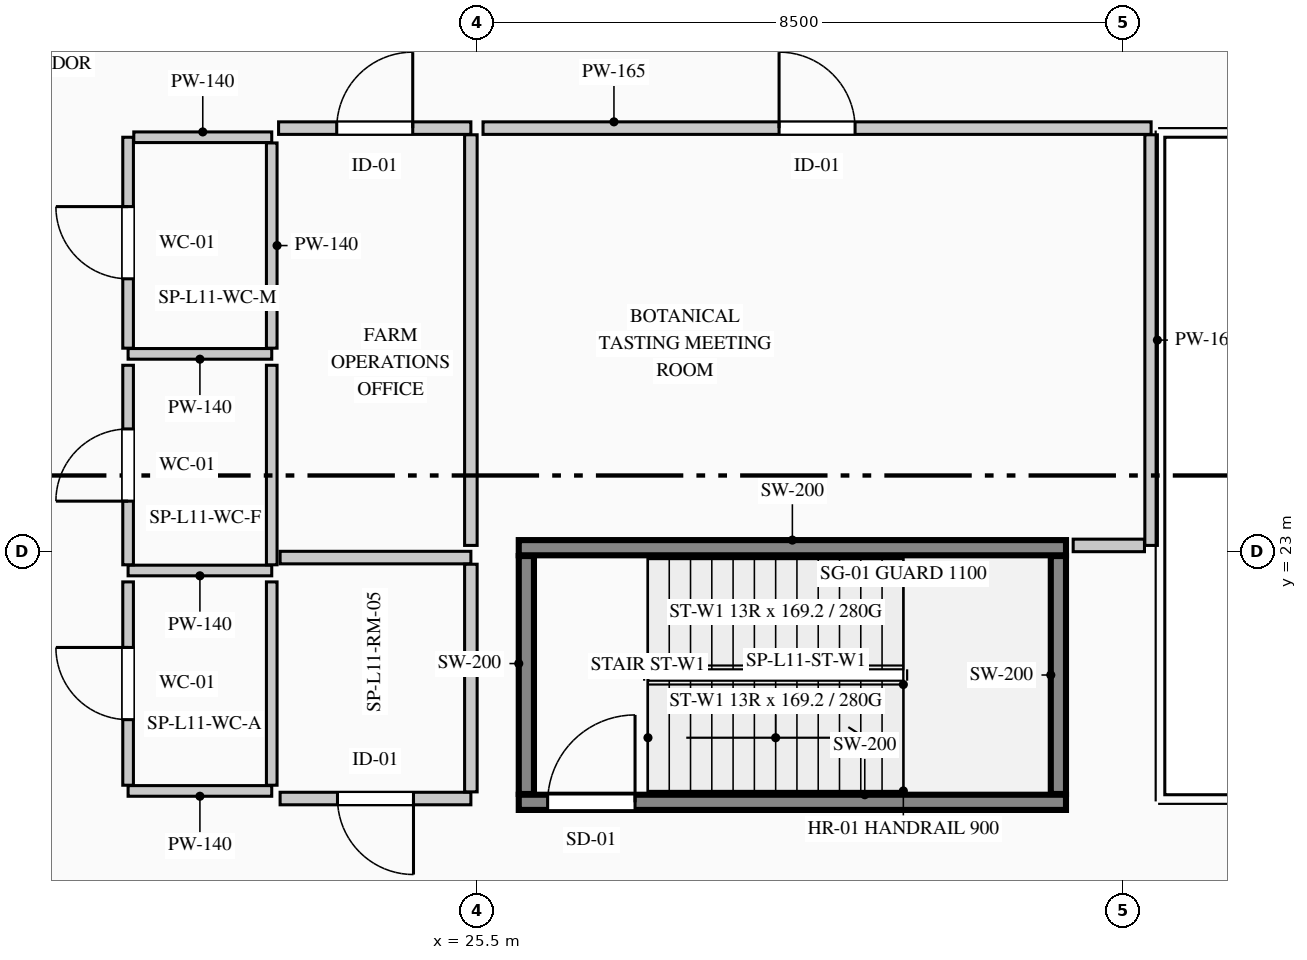
"""IFC4 building model, lengths in metres.
Left out: names, types, materials, properties, quantities, classifications, styles, units other than length and angle.
Written with IfcOpenShell. Run it as: python <this file> out.ifc"""

import sys

from ifc_helpers import new_model, si_unit, direction, frame, frame_2d, origin, place, context, subcontext, project, spatial, rectangle, extrude, element, fill, save


model = new_model("IFC4")
c1 = context("Model", 3, precision=1e-05, world=origin(), true_north=direction((0.0, 1.0)))
c2 = subcontext(c1, "Body", "Model", "MODEL_VIEW")
j1 = project(units=[si_unit("LENGTHUNIT", "METRE"), si_unit("PLANEANGLEUNIT", "RADIAN")], contexts=[c1])
p1 = place(None, origin())
s1 = spatial("IfcSite", under=j1, at=p1, CompositionType="ELEMENT")
p2 = place(p1, origin())
s2 = spatial("IfcBuilding", under=s1, at=p2, CompositionType="ELEMENT")
p3 = place(p2, frame((0.0, 0.0, 49.0)))
s3 = spatial("IfcBuildingStorey", under=s2, at=p3, CompositionType="ELEMENT", Elevation=49.0)
p4 = place(p3, frame((26.05, 19.7, 0.0), z_axis=(0.0, 0.0, 1.0), x_axis=(1.0, 0.0, 0.0)))
e1 = element("IfcWall", 1, at=p4, inside=s3, PredefinedType="SHEAR", context=c2, shape_type="SweptSolid", body=[
    extrude(rectangle(XDim=7.2, YDim=0.2, at=frame_2d((3.6, 0.0))), origin(), (0.0, 0.0, 1.0), 4.4),
])
p5 = place(p4, frame((0.38, 0.0, 0.0)))
e2 = element("IfcOpeningElement", 2, at=p5, cuts=e1, PredefinedType="OPENING", context=c2, shape_type="SweptSolid", body=[
    extrude(rectangle(XDim=1.15, YDim=2.2, at=frame_2d((0.575, 1.1))), frame((0.0, 0.11, 0.0), z_axis=(0.0, -1.0, 0.0), x_axis=(1.0, 0.0, 0.0)), (0.0, 0.0, 1.0), 0.22),
])
p6 = place(p3, frame((26.05, 23.05, 0.0), z_axis=(0.0, 0.0, 1.0), x_axis=(1.0, 0.0, 0.0)))
e3 = element("IfcWall", 3, at=p6, inside=s3, PredefinedType="SHEAR", context=c2, shape_type="SweptSolid", body=[
    extrude(rectangle(XDim=7.2, YDim=0.2, at=frame_2d((3.6, 0.0))), origin(), (0.0, 0.0, 1.0), 4.4),
])
for number, where, z_axis, x_axis in (
    (4, (26.15, 19.81, 0.0), (0.0, 0.0, 1.0), (0.0, 1.0, 0.0)),
    (5, (33.15, 19.81, 0.0), (0.0, 0.0, 1.0), (0.0, 1.0, 0.0)),
):
    element("IfcWall", number, at=place(p3, frame(where, z_axis=z_axis, x_axis=x_axis)), inside=s3, PredefinedType="SHEAR", context=c2, shape_type="SweptSolid", body=[
        extrude(rectangle(XDim=3.13, YDim=0.2, at=frame_2d((1.565, 0.0))), origin(), (0.0, 0.0, 1.0), 4.4),
    ])
p7 = place(p3, frame((22.8, 25.6, 0.0), z_axis=(0.0, 0.0, 1.0), x_axis=(-1.0, 0.0, 0.0)))
e6 = element("IfcWall", 6, at=p7, inside=s3, PredefinedType="PARTITIONING", context=c2, shape_type="SweptSolid", body=[
    extrude(rectangle(XDim=1.89, YDim=0.14, at=frame_2d((0.945, 0.0))), origin(), (0.0, 0.0, 1.0), 4.1),
])
p8 = place(p3, frame((20.91, 25.675, 0.0), z_axis=(0.0, 0.0, 1.0), x_axis=(0.0, 1.0, 0.0)))
e7 = element("IfcWall", 7, at=p8, inside=s3, PredefinedType="PARTITIONING", context=c2, shape_type="SweptSolid", body=[
    extrude(rectangle(XDim=2.775, YDim=0.14, at=frame_2d((1.387, 0.0))), origin(), (0.0, 0.0, 1.0), 4.1),
])
p9 = place(p8, frame((0.913, 0.0, 0.0)))
e8 = element("IfcOpeningElement", 8, at=p9, cuts=e7, PredefinedType="OPENING", context=c2, shape_type="SweptSolid", body=[
    extrude(rectangle(XDim=0.95, YDim=2.15, at=frame_2d((0.475, 1.075))), frame((0.0, 0.08, 0.0), z_axis=(0.0, -1.0, 0.0), x_axis=(1.0, 0.0, 0.0)), (0.0, 0.0, 1.0), 0.16),
])
p10 = place(p3, frame((20.985, 28.45, 0.0), z_axis=(0.0, 0.0, 1.0), x_axis=(1.0, 0.0, 0.0)))
e9 = element("IfcWall", 9, at=p10, inside=s3, PredefinedType="PARTITIONING", context=c2, shape_type="SweptSolid", body=[
    extrude(rectangle(XDim=1.815, YDim=0.14, at=frame_2d((0.907, 0.0))), origin(), (0.0, 0.0, 1.0), 4.1),
])
p11 = place(p3, frame((22.8, 28.375, 0.0), z_axis=(0.0, 0.0, 1.0), x_axis=(0.0, -1.0, 0.0)))
e10 = element("IfcWall", 10, at=p11, inside=s3, PredefinedType="PARTITIONING", context=c2, shape_type="SweptSolid", body=[
    extrude(rectangle(XDim=2.7, YDim=0.14, at=frame_2d((1.35, 0.0))), origin(), (0.0, 0.0, 1.0), 3.785),
])
p12 = place(p3, frame((22.8, 22.75, 0.0), z_axis=(0.0, 0.0, 1.0), x_axis=(-1.0, 0.0, 0.0)))
e11 = element("IfcWall", 11, at=p12, inside=s3, PredefinedType="PARTITIONING", context=c2, shape_type="SweptSolid", body=[
    extrude(rectangle(XDim=1.89, YDim=0.14, at=frame_2d((0.945, 0.0))), origin(), (0.0, 0.0, 1.0), 4.1),
])
p13 = place(p3, frame((20.91, 22.825, 0.0), z_axis=(0.0, 0.0, 1.0), x_axis=(0.0, 1.0, 0.0)))
e12 = element("IfcWall", 12, at=p13, inside=s3, PredefinedType="PARTITIONING", context=c2, shape_type="SweptSolid", body=[
    extrude(rectangle(XDim=2.625, YDim=0.14, at=frame_2d((1.312, 0.0))), origin(), (0.0, 0.0, 1.0), 4.1),
])
p14 = place(p13, frame((0.837, 0.0, 0.0)))
e13 = element("IfcOpeningElement", 13, at=p14, cuts=e12, PredefinedType="OPENING", context=c2, shape_type="SweptSolid", body=[
    extrude(rectangle(XDim=0.95, YDim=2.15, at=frame_2d((0.475, 1.075))), frame((0.0, 0.08, 0.0), z_axis=(0.0, -1.0, 0.0), x_axis=(1.0, 0.0, 0.0)), (0.0, 0.0, 1.0), 0.16),
])
p15 = place(p3, frame((22.8, 25.45, 0.0), z_axis=(0.0, 0.0, 1.0), x_axis=(0.0, -1.0, 0.0)))
e14 = element("IfcWall", 14, at=p15, inside=s3, PredefinedType="PARTITIONING", context=c2, shape_type="SweptSolid", body=[
    extrude(rectangle(XDim=2.625, YDim=0.14, at=frame_2d((1.312, 0.0))), origin(), (0.0, 0.0, 1.0), 3.785),
])
p16 = place(p3, frame((22.8, 19.85, 0.0), z_axis=(0.0, 0.0, 1.0), x_axis=(-1.0, 0.0, 0.0)))
e15 = element("IfcWall", 15, at=p16, inside=s3, PredefinedType="PARTITIONING", context=c2, shape_type="SweptSolid", body=[
    extrude(rectangle(XDim=1.89, YDim=0.14, at=frame_2d((0.945, 0.0))), origin(), (0.0, 0.0, 1.0), 4.1),
])
p17 = place(p3, frame((20.91, 19.925, 0.0), z_axis=(0.0, 0.0, 1.0), x_axis=(0.0, 1.0, 0.0)))
e16 = element("IfcWall", 16, at=p17, inside=s3, PredefinedType="PARTITIONING", context=c2, shape_type="SweptSolid", body=[
    extrude(rectangle(XDim=2.675, YDim=0.14, at=frame_2d((1.337, 0.0))), origin(), (0.0, 0.0, 1.0), 4.1),
])
p18 = place(p17, frame((0.863, 0.0, 0.0)))
e17 = element("IfcOpeningElement", 17, at=p18, cuts=e16, PredefinedType="OPENING", context=c2, shape_type="SweptSolid", body=[
    extrude(rectangle(XDim=0.95, YDim=2.15, at=frame_2d((0.475, 1.075))), frame((0.0, 0.08, 0.0), z_axis=(0.0, -1.0, 0.0), x_axis=(1.0, 0.0, 0.0)), (0.0, 0.0, 1.0), 0.16),
])
p19 = place(p3, frame((22.8, 22.6, 0.0), z_axis=(0.0, 0.0, 1.0), x_axis=(0.0, -1.0, 0.0)))
e18 = element("IfcWall", 18, at=p19, inside=s3, PredefinedType="PARTITIONING", context=c2, shape_type="SweptSolid", body=[
    extrude(rectangle(XDim=2.675, YDim=0.14, at=frame_2d((1.337, 0.0))), origin(), (0.0, 0.0, 1.0), 3.785),
])
p20 = place(p3, frame((25.42, 19.75, 0.0), z_axis=(0.0, 0.0, 1.0), x_axis=(-1.0, 0.0, 0.0)))
e19 = element("IfcWall", 19, at=p20, inside=s3, PredefinedType="PARTITIONING", context=c2, shape_type="SweptSolid", body=[
    extrude(rectangle(XDim=2.51, YDim=0.165, at=frame_2d((1.255, 0.0))), origin(), (0.0, 0.0, 1.0), 4.1),
])
p21 = place(p20, frame((0.755, 0.0, 0.0)))
e20 = element("IfcOpeningElement", 20, at=p21, cuts=e19, PredefinedType="OPENING", context=c2, shape_type="SweptSolid", body=[
    extrude(rectangle(XDim=1.0, YDim=2.15, at=frame_2d((0.5, 1.075))), frame((0.0, 0.093, 0.0), z_axis=(0.0, -1.0, 0.0), x_axis=(1.0, 0.0, 0.0)), (0.0, 0.0, 1.0), 0.185),
])
p22 = place(p3, frame((22.91, 22.92, 0.0), z_axis=(0.0, 0.0, 1.0), x_axis=(1.0, 0.0, 0.0)))
e21 = element("IfcWall", 21, at=p22, inside=s3, PredefinedType="PARTITIONING", context=c2, shape_type="SweptSolid", body=[
    extrude(rectangle(XDim=2.51, YDim=0.165, at=frame_2d((1.255, 0.0))), origin(), (0.0, 0.0, 1.0), 4.1),
])
p23 = place(p3, frame((25.42, 22.833, 0.0), z_axis=(0.0, 0.0, 1.0), x_axis=(0.0, -1.0, 0.0)))
e22 = element("IfcWall", 22, at=p23, inside=s3, PredefinedType="PARTITIONING", context=c2, shape_type="SweptSolid", body=[
    extrude(rectangle(XDim=2.995, YDim=0.165, at=frame_2d((1.498, 0.0))), origin(), (0.0, 0.0, 1.0), 3.285),
])
p24 = place(p3, frame((22.89, 28.57, 0.0), z_axis=(0.0, 0.0, 1.0), x_axis=(1.0, 0.0, 0.0)))
e23 = element("IfcWall", 23, at=p24, inside=s3, PredefinedType="PARTITIONING", context=c2, shape_type="SweptSolid", body=[
    extrude(rectangle(XDim=2.53, YDim=0.165, at=frame_2d((1.265, 0.0))), origin(), (0.0, 0.0, 1.0), 4.1),
])
p25 = place(p24, frame((0.765, 0.0, 0.0)))
e24 = element("IfcOpeningElement", 24, at=p25, cuts=e23, PredefinedType="OPENING", context=c2, shape_type="SweptSolid", body=[
    extrude(rectangle(XDim=1.0, YDim=2.15, at=frame_2d((0.5, 1.075))), frame((0.0, 0.093, 0.0), z_axis=(0.0, -1.0, 0.0), x_axis=(1.0, 0.0, 0.0)), (0.0, 0.0, 1.0), 0.185),
])
p26 = place(p3, frame((25.42, 28.482, 0.0), z_axis=(0.0, 0.0, 1.0), x_axis=(0.0, -1.0, 0.0)))
e25 = element("IfcWall", 25, at=p26, inside=s3, PredefinedType="PARTITIONING", context=c2, shape_type="SweptSolid", body=[
    extrude(rectangle(XDim=5.402, YDim=0.165, at=frame_2d((2.701, 0.0))), origin(), (0.0, 0.0, 1.0), 3.285),
])
p27 = place(p3, frame((25.58, 28.57, 0.0), z_axis=(0.0, 0.0, 1.0), x_axis=(1.0, 0.0, 0.0)))
e26 = element("IfcWall", 26, at=p27, inside=s3, PredefinedType="PARTITIONING", context=c2, shape_type="SweptSolid", body=[
    extrude(rectangle(XDim=8.79, YDim=0.165, at=frame_2d((4.395, 0.0))), origin(), (0.0, 0.0, 1.0), 3.785),
])
p28 = place(p27, frame((3.895, 0.0, 0.0)))
e27 = element("IfcOpeningElement", 27, at=p28, cuts=e26, PredefinedType="OPENING", context=c2, shape_type="SweptSolid", body=[
    extrude(rectangle(XDim=1.0, YDim=2.15, at=frame_2d((0.5, 1.075))), frame((0.0, 0.093, 0.0), z_axis=(0.0, -1.0, 0.0), x_axis=(1.0, 0.0, 0.0)), (0.0, 0.0, 1.0), 0.185),
])
p29 = place(p3, frame((34.37, 28.482, 0.0), z_axis=(0.0, 0.0, 1.0), x_axis=(0.0, -1.0, 0.0)))
e28 = element("IfcWall", 28, at=p29, inside=s3, PredefinedType="PARTITIONING", context=c2, shape_type="SweptSolid", body=[
    extrude(rectangle(XDim=5.402, YDim=0.165, at=frame_2d((2.701, 0.0))), origin(), (0.0, 0.0, 1.0), 4.1),
])
p30 = place(p3, frame((34.282, 23.08, 0.0), z_axis=(0.0, 0.0, 1.0), x_axis=(-1.0, 0.0, 0.0)))
e29 = element("IfcWall", 29, at=p30, inside=s3, PredefinedType="PARTITIONING", context=c2, shape_type="SweptSolid", body=[
    extrude(rectangle(XDim=0.938, YDim=0.165, at=frame_2d((0.469, 0.0))), origin(), (0.0, 0.0, 1.0), 4.1),
])
p31 = place(p5, origin())
e30 = element("IfcDoor", 30, at=p31, inside=s3, OperationType="SINGLE_SWING_RIGHT", PredefinedType="DOOR", context=c2, shape_type="SweptSolid", body=[
    extrude(rectangle(XDim=1.15, YDim=2.2, at=frame_2d((0.575, 1.1))), frame((0.0, 0.025, 0.0), z_axis=(0.0, -1.0, 0.0), x_axis=(1.0, 0.0, 0.0)), (0.0, 0.0, 1.0), 0.05),
])
fill(e2, e30)
p32 = place(p9, origin())
e31 = element("IfcDoor", 31, at=p32, inside=s3, OperationType="SINGLE_SWING_RIGHT", PredefinedType="DOOR", context=c2, shape_type="SweptSolid", body=[
    extrude(rectangle(XDim=0.95, YDim=2.15, at=frame_2d((0.475, 1.075))), frame((0.0, 0.025, 0.0), z_axis=(0.0, -1.0, 0.0), x_axis=(1.0, 0.0, 0.0)), (0.0, 0.0, 1.0), 0.05),
])
fill(e8, e31)
p33 = place(p14, origin())
e32 = element("IfcDoor", 32, at=p33, inside=s3, OperationType="SINGLE_SWING_LEFT", PredefinedType="DOOR", context=c2, shape_type="SweptSolid", body=[
    extrude(rectangle(XDim=0.95, YDim=2.15, at=frame_2d((0.475, 1.075))), frame((0.0, 0.025, 0.0), z_axis=(0.0, -1.0, 0.0), x_axis=(1.0, 0.0, 0.0)), (0.0, 0.0, 1.0), 0.05),
])
fill(e13, e32)
p34 = place(p18, origin())
e33 = element("IfcDoor", 33, at=p34, inside=s3, OperationType="SINGLE_SWING_RIGHT", PredefinedType="DOOR", context=c2, shape_type="SweptSolid", body=[
    extrude(rectangle(XDim=0.95, YDim=2.15, at=frame_2d((0.475, 1.075))), frame((0.0, 0.025, 0.0), z_axis=(0.0, -1.0, 0.0), x_axis=(1.0, 0.0, 0.0)), (0.0, 0.0, 1.0), 0.05),
])
fill(e17, e33)
p35 = place(p21, origin())
e34 = element("IfcDoor", 34, at=p35, inside=s3, OperationType="SINGLE_SWING_LEFT", PredefinedType="DOOR", context=c2, shape_type="SweptSolid", body=[
    extrude(rectangle(XDim=1.0, YDim=2.15, at=frame_2d((0.5, 1.075))), frame((0.0, 0.025, 0.0), z_axis=(0.0, -1.0, 0.0), x_axis=(1.0, 0.0, 0.0)), (0.0, 0.0, 1.0), 0.05),
])
fill(e20, e34)
p36 = place(p25, origin())
e35 = element("IfcDoor", 35, at=p36, inside=s3, OperationType="SINGLE_SWING_RIGHT", PredefinedType="DOOR", context=c2, shape_type="SweptSolid", body=[
    extrude(rectangle(XDim=1.0, YDim=2.15, at=frame_2d((0.5, 1.075))), frame((0.0, 0.025, 0.0), z_axis=(0.0, -1.0, 0.0), x_axis=(1.0, 0.0, 0.0)), (0.0, 0.0, 1.0), 0.05),
])
fill(e24, e35)
p37 = place(p28, origin())
e36 = element("IfcDoor", 36, at=p37, inside=s3, OperationType="SINGLE_SWING_LEFT", PredefinedType="DOOR", context=c2, shape_type="SweptSolid", body=[
    extrude(rectangle(XDim=1.0, YDim=2.15, at=frame_2d((0.5, 1.075))), frame((0.0, 0.025, 0.0), z_axis=(0.0, -1.0, 0.0), x_axis=(1.0, 0.0, 0.0)), (0.0, 0.0, 1.0), 0.05),
])
fill(e27, e36)
save(model, sys.argv[1])
